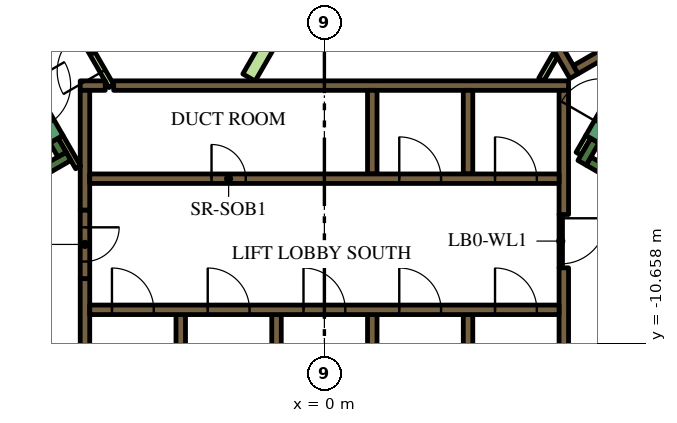
"""IFC4 building model, lengths in metres.
Left out: names, types, materials, properties, quantities, classifications, styles, units other than length and angle.
Written with IfcOpenShell. Run it as: python <this file> out.ifc"""

import sys

from ifc_helpers import new_model, si_unit, direction, frame, frame_2d, origin, place, context, subcontext, project, spatial, polyline, rectangle, outline, extrude, element, fill, save


model = new_model("IFC4")
c1 = context("Model", 3, precision=1e-05, world=origin(), true_north=direction((0.0, 1.0)))
c2 = subcontext(c1, "Body", "Model", "MODEL_VIEW")
j1 = project(units=[si_unit("LENGTHUNIT", "METRE"), si_unit("PLANEANGLEUNIT", "RADIAN")], contexts=[c1])
p1 = place(None, origin())
s1 = spatial("IfcSite", under=j1, at=p1, CompositionType="ELEMENT")
p2 = place(p1, origin())
s2 = spatial("IfcBuilding", under=s1, at=p2, CompositionType="ELEMENT")
p3 = place(p2, frame((0.0, 0.0, 35.4)))
s3 = spatial("IfcBuildingStorey", under=s2, at=p3, CompositionType="ELEMENT", Elevation=35.4)
p4 = place(p3, frame((6.711, 13.476, 0.0), z_axis=(0.0, 0.0, 1.0), x_axis=(0.500002723396, -0.866023831425, 0.0)))
e1 = element("IfcWall", 1, at=p4, inside=s3, PredefinedType="SOLIDWALL", context=c2, shape_type="SweptSolid", body=[
    extrude(rectangle(XDim=20.334, YDim=0.9, at=frame_2d((10.167, 0.0))), origin(), (0.0, 0.0, 1.0), 3.9),
])
p5 = place(p3, frame((12.84, -9.261, 0.0), z_axis=(0.0, 0.0, 1.0), x_axis=(-0.866013990052, 0.500019768644, 0.0)))
e2 = element("IfcWall", 2, at=p5, inside=s3, PredefinedType="SOLIDWALL", context=c2, shape_type="SweptSolid", body=[
    extrude(rectangle(XDim=6.8, YDim=0.25, at=frame_2d((3.4, 0.0))), origin(), (0.0, 0.0, 1.0), 3.9),
])
p6 = place(p3, frame((6.78, -5.906, 0.0), z_axis=(0.0, 0.0, 1.0), x_axis=(0.500223362819, 0.865896406789, 0.0)))
e3 = element("IfcWall", 3, at=p6, inside=s3, PredefinedType="SOLIDWALL", context=c2, shape_type="SweptSolid", body=[
    extrude(rectangle(XDim=0.675, YDim=0.25, at=frame_2d((0.337, 0.0))), origin(), (0.0, 0.0, 1.0), 3.9),
])
p7 = place(p3, frame((-12.84, -9.261, 0.0), z_axis=(0.0, 0.0, 1.0), x_axis=(0.866016039709, 0.500016218704, 0.0)))
e4 = element("IfcWall", 4, at=p7, inside=s3, PredefinedType="SOLIDWALL", context=c2, shape_type="SweptSolid", body=[
    extrude(rectangle(XDim=7.05, YDim=0.25, at=frame_2d((3.525, 0.0))), origin(), (0.0, 0.0, 1.0), 3.9),
])
p8 = place(p3, frame((-6.905, -5.69, 0.0), z_axis=(0.0, 0.0, 1.0), x_axis=(-0.500402024738, 0.865793170242, 0.0)))
e5 = element("IfcWall", 5, at=p8, inside=s3, PredefinedType="SOLIDWALL", context=c2, shape_type="SweptSolid", body=[
    extrude(rectangle(XDim=0.425, YDim=0.25, at=frame_2d((0.212, 0.0))), origin(), (0.0, 0.0, 1.0), 3.9),
])
p9 = place(p3, frame((-3.78, -12.1, 0.0), z_axis=(0.0, 0.0, 1.0), x_axis=(0.0, 1.0, 0.0)))
e6 = element("IfcWall", 6, at=p9, inside=s3, PredefinedType="SOLIDWALL", context=c2, shape_type="SweptSolid", body=[
    extrude(rectangle(XDim=2.2, YDim=0.25, at=frame_2d((1.1, 0.0))), origin(), (0.0, 0.0, 1.0), 3.9),
])
p10 = place(p3, frame((-6.3, -12.1, 0.0), z_axis=(0.0, 0.0, 1.0), x_axis=(0.0, 1.0, 0.0)))
e7 = element("IfcWall", 7, at=p10, inside=s3, PredefinedType="SOLIDWALL", context=c2, shape_type="SweptSolid", body=[
    extrude(rectangle(XDim=3.146, YDim=0.25, at=frame_2d((1.573, 0.0))), origin(), (0.0, 0.0, 1.0), 3.9),
])
p11 = place(p3, frame((-5.545, -3.875, 0.0), z_axis=(0.0, 0.0, 1.0), x_axis=(1.0, 0.0, 0.0)))
e8 = element("IfcWall", 8, at=p11, inside=s3, PredefinedType="SOLIDWALL", context=c2, shape_type="SweptSolid", body=[
    extrude(rectangle(XDim=11.97, YDim=0.25, at=frame_2d((5.985, 0.0))), origin(), (0.0, 0.0, 1.0), 3.9),
])
p12 = place(p3, frame((-6.425, -3.875, 0.0), z_axis=(0.0, 0.0, 1.0), x_axis=(1.0, 0.0, 0.0)))
e9 = element("IfcWall", 9, at=p12, inside=s3, PredefinedType="SOLIDWALL", context=c2, shape_type="SweptSolid", body=[
    extrude(rectangle(XDim=0.658, YDim=0.25, at=frame_2d((0.329, 0.0))), origin(), (0.0, 0.0, 1.0), 3.9),
])
p13 = place(p3, frame((6.3, -8.67, 0.0), z_axis=(0.0, 0.0, 1.0), x_axis=(0.0, -1.0, 0.0)))
e10 = element("IfcWall", 10, at=p13, inside=s3, PredefinedType="SOLIDWALL", context=c2, shape_type="SweptSolid", body=[
    extrude(rectangle(XDim=3.43, YDim=0.25, at=frame_2d((1.715, 0.0))), origin(), (0.0, 0.0, 1.0), 3.9),
])
p14 = place(p3, frame((6.3, -7.268, 0.0), z_axis=(0.0, 0.0, 1.0), x_axis=(0.0, 1.0, 0.0)))
e11 = element("IfcWall", 11, at=p14, inside=s3, PredefinedType="SOLIDWALL", context=c2, shape_type="SweptSolid", body=[
    extrude(rectangle(XDim=3.268, YDim=0.25, at=frame_2d((1.634, 0.0))), origin(), (0.0, 0.0, 1.0), 3.9),
])
for number, where, z_axis, x_axis in (
    (12, (3.78, -4.0, 0.0), (0.0, 0.0, 1.0), (0.0, -1.0, 0.0)),
    (13, (1.26, -4.0, 0.0), (0.0, 0.0, 1.0), (0.0, -1.0, 0.0)),
):
    element("IfcWall", number, at=place(p3, frame(where, z_axis=z_axis, x_axis=x_axis)), inside=s3, PredefinedType="SOLIDWALL", context=c2, shape_type="SweptSolid", body=[
        extrude(rectangle(XDim=2.2, YDim=0.25, at=frame_2d((1.1, 0.0))), origin(), (0.0, 0.0, 1.0), 3.9),
    ])
p15 = place(p3, frame((-6.3, -4.0, 0.0), z_axis=(0.0, 0.0, 1.0), x_axis=(0.0, -1.0, 0.0)))
e14 = element("IfcWall", 14, at=p15, inside=s3, PredefinedType="SOLIDWALL", context=c2, shape_type="SweptSolid", body=[
    extrude(rectangle(XDim=3.154, YDim=0.25, at=frame_2d((1.577, 0.0))), origin(), (0.0, 0.0, 1.0), 3.9),
])
for number, where, z_axis, x_axis in (
    (15, (3.78, -12.1, 0.0), (0.0, 0.0, 1.0), (0.0, 1.0, 0.0)),
    (16, (1.26, -12.1, 0.0), (0.0, 0.0, 1.0), (0.0, 1.0, 0.0)),
    (17, (-1.26, -12.1, 0.0), (0.0, 0.0, 1.0), (0.0, 1.0, 0.0)),
):
    element("IfcWall", number, at=place(p3, frame(where, z_axis=z_axis, x_axis=x_axis)), inside=s3, PredefinedType="SOLIDWALL", context=c2, shape_type="SweptSolid", body=[
        extrude(rectangle(XDim=2.2, YDim=0.25, at=frame_2d((1.1, 0.0))), origin(), (0.0, 0.0, 1.0), 3.9),
    ])
p16 = place(p3, origin())
e18 = element("IfcWall", 18, at=p16, inside=s3, PredefinedType="SOLIDWALL", context=c2, shape_type="SweptSolid", body=[
    extrude(outline(polyline([(0.566, 6.725), (0.566, 6.875), (0.566, 6.875), (0.565, 6.875), (0.361, 6.875), (0.035, 7.439), (0.252, 7.564), (0.377, 7.348), (6.552, -3.348), (6.677, -3.564), (6.46, -3.689), (0.448, 6.725), (0.565, 6.725), (0.566, 6.725), (0.566, 6.725)])), origin(), (0.0, 0.0, 1.0), 3.9),
])
p17 = place(p3, frame((6.614, -3.456, 0.0), z_axis=(0.0, 0.0, 1.0), x_axis=(0.86602447079, 0.500001615989, 0.0)))
e19 = element("IfcWall", 19, at=p17, inside=s3, PredefinedType="SOLIDWALL", context=c2, shape_type="SweptSolid", body=[
    extrude(rectangle(XDim=3.154, YDim=0.25, at=frame_2d((1.577, 0.0))), origin(), (0.0, 0.0, 1.0), 3.9),
])
p18 = place(p3, frame((-6.48, -6.027, 0.0), z_axis=(0.0, 0.0, 1.0), x_axis=(-0.499927229454, 0.866067413802, 0.0)))
e20 = element("IfcWall", 20, at=p18, inside=s3, PredefinedType="PARTITIONING", context=c2, shape_type="SweptSolid", body=[
    extrude(rectangle(XDim=0.929, YDim=0.15, at=frame_2d((0.464, 0.0))), origin(), (0.0, 0.0, 1.0), 3.9),
])
p19 = place(p3, frame((6.945, -5.222, 0.0), z_axis=(0.0, 0.0, 1.0), x_axis=(-0.499818422106, -0.866130212453, 0.0)))
e21 = element("IfcWall", 21, at=p19, inside=s3, PredefinedType="PARTITIONING", context=c2, shape_type="SweptSolid", body=[
    extrude(rectangle(XDim=0.514, YDim=0.15, at=frame_2d((0.257, 0.0))), origin(), (0.0, 0.0, 1.0), 2.75),
])
p20 = place(p3, frame((5.705, -3.718, 0.0), z_axis=(0.0, 0.0, 1.0), x_axis=(0.499962090823, 0.866047289552, 0.0)))
e22 = element("IfcWall", 22, at=p20, inside=s3, PredefinedType="PARTITIONING", context=c2, shape_type="SweptSolid", body=[
    extrude(rectangle(XDim=0.735, YDim=0.15, at=frame_2d((0.367, 0.0))), origin(), (0.0, 0.0, 1.0), 2.75),
])
e23 = element("IfcWall", 23, at=p16, inside=s3, PredefinedType="PARTITIONING", context=c2, shape_type="SweptSolid", body=[
    extrude(outline(polyline([(-0.59, -0.872), (-0.265, -1.059), (-1.822, -3.756), (-2.147, -3.568), (-0.59, -0.872)])), origin(), (0.0, 0.0, 1.0), 2.75),
])
p21 = place(p3, frame((-6.175, -9.775, 0.0), z_axis=(0.0, 0.0, 1.0), x_axis=(1.0, 0.0, 0.0)))
e24 = element("IfcWall", 24, at=p21, inside=s3, PredefinedType="SOLIDWALL", context=c2, shape_type="SweptSolid", body=[
    extrude(rectangle(XDim=12.35, YDim=0.25, at=frame_2d((6.175, 0.0))), origin(), (0.0, 0.0, 1.0), 3.9),
])
p22 = place(p21, frame((0.585, 0.0, 0.0)))
e25 = element("IfcOpeningElement", 25, at=p22, cuts=e24, PredefinedType="OPENING", context=c2, shape_type="SweptSolid", body=[
    extrude(rectangle(XDim=1.1, YDim=2.1, at=frame_2d((0.55, 1.05))), frame((0.0, 0.135, 0.0), z_axis=(0.0, -1.0, 0.0), x_axis=(1.0, 0.0, 0.0)), (0.0, 0.0, 1.0), 0.27),
])
p23 = place(p21, frame((3.105, 0.0, 0.0)))
e26 = element("IfcOpeningElement", 26, at=p23, cuts=e24, PredefinedType="OPENING", context=c2, shape_type="SweptSolid", body=[
    extrude(rectangle(XDim=1.1, YDim=2.1, at=frame_2d((0.55, 1.05))), frame((0.0, 0.135, 0.0), z_axis=(0.0, -1.0, 0.0), x_axis=(1.0, 0.0, 0.0)), (0.0, 0.0, 1.0), 0.27),
])
p24 = place(p21, frame((5.625, 0.0, 0.0)))
e27 = element("IfcOpeningElement", 27, at=p24, cuts=e24, PredefinedType="OPENING", context=c2, shape_type="SweptSolid", body=[
    extrude(rectangle(XDim=1.1, YDim=2.1, at=frame_2d((0.55, 1.05))), frame((0.0, 0.135, 0.0), z_axis=(0.0, -1.0, 0.0), x_axis=(1.0, 0.0, 0.0)), (0.0, 0.0, 1.0), 0.27),
])
p25 = place(p21, frame((8.145, 0.0, 0.0)))
e28 = element("IfcOpeningElement", 28, at=p25, cuts=e24, PredefinedType="OPENING", context=c2, shape_type="SweptSolid", body=[
    extrude(rectangle(XDim=1.1, YDim=2.1, at=frame_2d((0.55, 1.05))), frame((0.0, 0.135, 0.0), z_axis=(0.0, -1.0, 0.0), x_axis=(1.0, 0.0, 0.0)), (0.0, 0.0, 1.0), 0.27),
])
p26 = place(p21, frame((10.665, 0.0, 0.0)))
e29 = element("IfcOpeningElement", 29, at=p26, cuts=e24, PredefinedType="OPENING", context=c2, shape_type="SweptSolid", body=[
    extrude(rectangle(XDim=1.1, YDim=2.1, at=frame_2d((0.55, 1.05))), frame((0.0, 0.135, 0.0), z_axis=(0.0, -1.0, 0.0), x_axis=(1.0, 0.0, 0.0)), (0.0, 0.0, 1.0), 0.27),
])
p27 = place(p3, frame((-6.175, -6.325, 0.0), z_axis=(0.0, 0.0, 1.0), x_axis=(1.0, 0.0, 0.0)))
e30 = element("IfcWall", 30, at=p27, inside=s3, PredefinedType="SOLIDWALL", context=c2, shape_type="SweptSolid", body=[
    extrude(rectangle(XDim=12.35, YDim=0.25, at=frame_2d((6.175, 0.0))), origin(), (0.0, 0.0, 1.0), 3.9),
])
p28 = place(p27, frame((3.205, 0.0, 0.0)))
e31 = element("IfcOpeningElement", 31, at=p28, cuts=e30, PredefinedType="OPENING", context=c2, shape_type="SweptSolid", body=[
    extrude(rectangle(XDim=0.9, YDim=2.1, at=frame_2d((0.45, 1.05))), frame((0.0, 0.135, 0.0), z_axis=(0.0, -1.0, 0.0), x_axis=(1.0, 0.0, 0.0)), (0.0, 0.0, 1.0), 0.27),
])
p29 = place(p27, frame((8.145, 0.0, 0.0)))
e32 = element("IfcOpeningElement", 32, at=p29, cuts=e30, PredefinedType="OPENING", context=c2, shape_type="SweptSolid", body=[
    extrude(rectangle(XDim=1.1, YDim=2.1, at=frame_2d((0.55, 1.05))), frame((0.0, 0.135, 0.0), z_axis=(0.0, -1.0, 0.0), x_axis=(1.0, 0.0, 0.0)), (0.0, 0.0, 1.0), 0.27),
])
p30 = place(p27, frame((10.665, 0.0, 0.0)))
e33 = element("IfcOpeningElement", 33, at=p30, cuts=e30, PredefinedType="OPENING", context=c2, shape_type="SweptSolid", body=[
    extrude(rectangle(XDim=1.1, YDim=2.1, at=frame_2d((0.55, 1.05))), frame((0.0, 0.135, 0.0), z_axis=(0.0, -1.0, 0.0), x_axis=(1.0, 0.0, 0.0)), (0.0, 0.0, 1.0), 0.27),
])
p31 = place(p3, frame((7.053, -5.284, 0.0), z_axis=(0.0, 0.0, 1.0), x_axis=(0.500078061341, 0.865980330357, 0.0)))
e34 = element("IfcWall", 34, at=p31, inside=s3, PredefinedType="SOLIDWALL", context=c2, shape_type="SweptSolid", body=[
    extrude(rectangle(XDim=2.1, YDim=0.4, at=frame_2d((1.05, 0.0))), origin(), (0.0, 0.0, 1.0), 3.9),
])
p32 = place(p31, frame((0.45, 0.0, 0.0)))
e35 = element("IfcOpeningElement", 35, at=p32, cuts=e34, PredefinedType="OPENING", context=c2, shape_type="SweptSolid", body=[
    extrude(rectangle(XDim=1.2, YDim=2.1, at=frame_2d((0.6, 1.05))), frame((0.0, 0.21, 0.0), z_axis=(0.0, -1.0, 0.0), x_axis=(1.0, 0.0, 0.0)), (0.0, 0.0, 1.0), 0.42),
])
p33 = place(p3, frame((-8.103, -3.466, 0.0), z_axis=(0.0, 0.0, 1.0), x_axis=(0.500078061341, -0.865980330357, 0.0)))
e36 = element("IfcWall", 36, at=p33, inside=s3, PredefinedType="SOLIDWALL", context=c2, shape_type="SweptSolid", body=[
    extrude(rectangle(XDim=2.1, YDim=0.4, at=frame_2d((1.05, 0.0))), origin(), (0.0, 0.0, 1.0), 3.9),
])
p34 = place(p33, frame((0.45, 0.0, 0.0)))
e37 = element("IfcOpeningElement", 37, at=p34, cuts=e36, PredefinedType="OPENING", context=c2, shape_type="SweptSolid", body=[
    extrude(rectangle(XDim=1.2, YDim=2.1, at=frame_2d((0.6, 1.05))), frame((0.0, 0.21, 0.0), z_axis=(0.0, -1.0, 0.0), x_axis=(1.0, 0.0, 0.0)), (0.0, 0.0, 1.0), 0.42),
])
p35 = place(p3, frame((-6.3, -7.154, 0.0), z_axis=(0.0, 0.0, 1.0), x_axis=(0.0, -1.0, 0.0)))
e38 = element("IfcWall", 38, at=p35, inside=s3, PredefinedType="SOLIDWALL", context=c2, shape_type="SweptSolid", body=[
    extrude(rectangle(XDim=1.8, YDim=0.25, at=frame_2d((0.9, 0.0))), origin(), (0.0, 0.0, 1.0), 3.9),
])
p36 = place(p35, frame((0.45, 0.0, 0.0)))
e39 = element("IfcOpeningElement", 39, at=p36, cuts=e38, PredefinedType="OPENING", context=c2, shape_type="SweptSolid", body=[
    extrude(rectangle(XDim=0.9, YDim=2.1, at=frame_2d((0.45, 1.05))), frame((0.0, 0.135, 0.0), z_axis=(0.0, -1.0, 0.0), x_axis=(1.0, 0.0, 0.0)), (0.0, 0.0, 1.0), 0.27),
])
p37 = place(p3, frame((-5.606, -3.89, 0.0), z_axis=(0.0, 0.0, 1.0), x_axis=(-0.500027713859, 0.866009402589, 0.0)))
e40 = element("IfcWall", 40, at=p37, inside=s3, PredefinedType="PARTITIONING", context=c2, shape_type="SweptSolid", body=[
    extrude(rectangle(XDim=2.1, YDim=0.15, at=frame_2d((1.05, 0.0))), origin(), (0.0, 0.0, 1.0), 2.75),
])
p38 = place(p37, frame((0.45, 0.0, 0.0)))
e41 = element("IfcOpeningElement", 41, at=p38, cuts=e40, PredefinedType="OPENING", context=c2, shape_type="SweptSolid", body=[
    extrude(rectangle(XDim=1.2, YDim=2.1, at=frame_2d((0.6, 1.05))), frame((0.0, 0.085, 0.0), z_axis=(0.0, -1.0, 0.0), x_axis=(1.0, 0.0, 0.0)), (0.0, 0.0, 1.0), 0.17),
])
p39 = place(p3, frame((6.22, -7.266, 0.0), z_axis=(0.0, 0.0, 1.0), x_axis=(0.0, -1.0, 0.0)))
e42 = element("IfcWall", 42, at=p39, inside=s3, PredefinedType="PARTITIONING", context=c2, shape_type="SweptSolid", body=[
    extrude(rectangle(XDim=1.4, YDim=0.09, at=frame_2d((0.7, 0.0))), origin(), (0.0, 0.0, 1.0), 2.75),
])
p40 = place(p39, frame((0.1, 0.0, 0.0)))
e43 = element("IfcOpeningElement", 43, at=p40, cuts=e42, PredefinedType="OPENING", context=c2, shape_type="SweptSolid", body=[
    extrude(rectangle(XDim=1.2, YDim=2.1, at=frame_2d((0.6, 1.05))), frame((0.0, 0.055, 0.0), z_axis=(0.0, -1.0, 0.0), x_axis=(1.0, 0.0, 0.0)), (0.0, 0.0, 1.0), 0.11),
])
p41 = place(p3, frame((6.163, 18.475, 0.0), z_axis=(0.0, 0.0, 1.0), x_axis=(0.500001317485, -0.866024643133, 0.0)))
e44 = element("IfcWall", 44, at=p41, inside=s3, PredefinedType="PARTITIONING", context=c2, shape_type="SweptSolid", body=[
    extrude(rectangle(XDim=25.767, YDim=0.15, at=frame_2d((12.883, 0.0))), origin(), (0.0, 0.0, 1.0), 2.75),
])
p42 = place(p41, frame((24.586, 0.0, 0.0)))
e45 = element("IfcOpeningElement", 45, at=p42, cuts=e44, PredefinedType="OPENING", context=c2, shape_type="SweptSolid", body=[
    extrude(rectangle(XDim=1.0, YDim=2.1, at=frame_2d((0.5, 1.05))), frame((0.0, 0.085, 0.0), z_axis=(0.0, -1.0, 0.0), x_axis=(1.0, 0.0, 0.0)), (0.0, 0.0, 1.0), 0.17),
])
p43 = place(p41, frame((19.319, 0.0, 0.0)))
e46 = element("IfcOpeningElement", 46, at=p43, cuts=e44, PredefinedType="OPENING", context=c2, shape_type="SweptSolid", body=[
    extrude(rectangle(XDim=1.0, YDim=2.1, at=frame_2d((0.5, 1.05))), frame((0.0, 0.085, 0.0), z_axis=(0.0, -1.0, 0.0), x_axis=(1.0, 0.0, 0.0)), (0.0, 0.0, 1.0), 0.17),
])
p44 = place(p41, frame((18.012, 0.0, 0.0)))
e47 = element("IfcOpeningElement", 47, at=p44, cuts=e44, PredefinedType="OPENING", context=c2, shape_type="SweptSolid", body=[
    extrude(rectangle(XDim=1.0, YDim=2.1, at=frame_2d((0.5, 1.05))), frame((0.0, 0.085, 0.0), z_axis=(0.0, -1.0, 0.0), x_axis=(1.0, 0.0, 0.0)), (0.0, 0.0, 1.0), 0.17),
])
p45 = place(p41, frame((6.824, 0.0, 0.0)))
e48 = element("IfcOpeningElement", 48, at=p45, cuts=e44, PredefinedType="OPENING", context=c2, shape_type="SweptSolid", body=[
    extrude(rectangle(XDim=1.1, YDim=2.1, at=frame_2d((0.55, 1.05))), frame((0.0, 0.085, 0.0), z_axis=(0.0, -1.0, 0.0), x_axis=(1.0, 0.0, 0.0)), (0.0, 0.0, 1.0), 0.17),
])
p46 = place(p41, frame((4.658, 0.0, 0.0)))
e49 = element("IfcOpeningElement", 49, at=p46, cuts=e44, PredefinedType="OPENING", context=c2, shape_type="SweptSolid", body=[
    extrude(rectangle(XDim=0.9, YDim=2.1, at=frame_2d((0.45, 1.05))), frame((0.0, 0.085, 0.0), z_axis=(0.0, -1.0, 0.0), x_axis=(1.0, 0.0, 0.0)), (0.0, 0.0, 1.0), 0.17),
])
p47 = place(p41, frame((0.18, 0.0, 0.0)))
e50 = element("IfcOpeningElement", 50, at=p47, cuts=e44, PredefinedType="OPENING", context=c2, shape_type="SweptSolid", body=[
    extrude(rectangle(XDim=1.0, YDim=2.1, at=frame_2d((0.5, 1.05))), frame((0.0, 0.085, 0.0), z_axis=(0.0, -1.0, 0.0), x_axis=(1.0, 0.0, 0.0)), (0.0, 0.0, 1.0), 0.17),
])
p48 = place(p3, frame((-19.081, -3.9, 0.0), z_axis=(0.0, 0.0, 1.0), x_axis=(0.499998313975, 0.866026377209, 0.0)))
e51 = element("IfcWall", 51, at=p48, inside=s3, PredefinedType="PARTITIONING", context=c2, shape_type="SweptSolid", body=[
    extrude(rectangle(XDim=25.766, YDim=0.15, at=frame_2d((12.883, 0.0))), origin(), (0.0, 0.0, 1.0), 2.75),
])
p49 = place(p48, frame((24.586, 0.0, 0.0)))
e52 = element("IfcOpeningElement", 52, at=p49, cuts=e51, PredefinedType="OPENING", context=c2, shape_type="SweptSolid", body=[
    extrude(rectangle(XDim=1.0, YDim=2.1, at=frame_2d((0.5, 1.05))), frame((0.0, 0.085, 0.0), z_axis=(0.0, -1.0, 0.0), x_axis=(1.0, 0.0, 0.0)), (0.0, 0.0, 1.0), 0.17),
])
p50 = place(p48, frame((16.196, 0.0, 0.0)))
e53 = element("IfcOpeningElement", 53, at=p50, cuts=e51, PredefinedType="OPENING", context=c2, shape_type="SweptSolid", body=[
    extrude(rectangle(XDim=1.0, YDim=2.1, at=frame_2d((0.5, 1.05))), frame((0.0, 0.085, 0.0), z_axis=(0.0, -1.0, 0.0), x_axis=(1.0, 0.0, 0.0)), (0.0, 0.0, 1.0), 0.17),
])
p51 = place(p48, frame((14.789, 0.0, 0.0)))
e54 = element("IfcOpeningElement", 54, at=p51, cuts=e51, PredefinedType="OPENING", context=c2, shape_type="SweptSolid", body=[
    extrude(rectangle(XDim=1.1, YDim=2.1, at=frame_2d((0.55, 1.05))), frame((0.0, 0.085, 0.0), z_axis=(0.0, -1.0, 0.0), x_axis=(1.0, 0.0, 0.0)), (0.0, 0.0, 1.0), 0.17),
])
p52 = place(p48, frame((3.698, 0.0, 0.0)))
e55 = element("IfcOpeningElement", 55, at=p52, cuts=e51, PredefinedType="OPENING", context=c2, shape_type="SweptSolid", body=[
    extrude(rectangle(XDim=1.0, YDim=2.1, at=frame_2d((0.5, 1.05))), frame((0.0, 0.085, 0.0), z_axis=(0.0, -1.0, 0.0), x_axis=(1.0, 0.0, 0.0)), (0.0, 0.0, 1.0), 0.17),
])
p53 = place(p48, frame((1.531, 0.0, 0.0)))
e56 = element("IfcOpeningElement", 56, at=p53, cuts=e51, PredefinedType="OPENING", context=c2, shape_type="SweptSolid", body=[
    extrude(rectangle(XDim=0.9, YDim=2.1, at=frame_2d((0.45, 1.05))), frame((0.0, 0.085, 0.0), z_axis=(0.0, -1.0, 0.0), x_axis=(1.0, 0.0, 0.0)), (0.0, 0.0, 1.0), 0.17),
])
p54 = place(p22, origin())
e57 = element("IfcDoor", 57, at=p54, inside=s3, OperationType="DOUBLE_DOOR_SLIDING", PredefinedType="DOOR", context=c2, shape_type="SweptSolid", body=[
    extrude(rectangle(XDim=1.1, YDim=2.1, at=frame_2d((0.55, 1.05))), frame((0.0, 0.025, 0.0), z_axis=(0.0, -1.0, 0.0), x_axis=(1.0, 0.0, 0.0)), (0.0, 0.0, 1.0), 0.05),
])
fill(e25, e57)
p55 = place(p23, origin())
e58 = element("IfcDoor", 58, at=p55, inside=s3, OperationType="DOUBLE_DOOR_SLIDING", PredefinedType="DOOR", context=c2, shape_type="SweptSolid", body=[
    extrude(rectangle(XDim=1.1, YDim=2.1, at=frame_2d((0.55, 1.05))), frame((0.0, 0.025, 0.0), z_axis=(0.0, -1.0, 0.0), x_axis=(1.0, 0.0, 0.0)), (0.0, 0.0, 1.0), 0.05),
])
fill(e26, e58)
p56 = place(p24, origin())
e59 = element("IfcDoor", 59, at=p56, inside=s3, OperationType="DOUBLE_DOOR_SLIDING", PredefinedType="DOOR", context=c2, shape_type="SweptSolid", body=[
    extrude(rectangle(XDim=1.1, YDim=2.1, at=frame_2d((0.55, 1.05))), frame((0.0, 0.025, 0.0), z_axis=(0.0, -1.0, 0.0), x_axis=(1.0, 0.0, 0.0)), (0.0, 0.0, 1.0), 0.05),
])
fill(e27, e59)
p57 = place(p25, origin())
e60 = element("IfcDoor", 60, at=p57, inside=s3, OperationType="DOUBLE_DOOR_SLIDING", PredefinedType="DOOR", context=c2, shape_type="SweptSolid", body=[
    extrude(rectangle(XDim=1.1, YDim=2.1, at=frame_2d((0.55, 1.05))), frame((0.0, 0.025, 0.0), z_axis=(0.0, -1.0, 0.0), x_axis=(1.0, 0.0, 0.0)), (0.0, 0.0, 1.0), 0.05),
])
fill(e28, e60)
p58 = place(p26, origin())
e61 = element("IfcDoor", 61, at=p58, inside=s3, OperationType="DOUBLE_DOOR_SLIDING", PredefinedType="DOOR", context=c2, shape_type="SweptSolid", body=[
    extrude(rectangle(XDim=1.1, YDim=2.1, at=frame_2d((0.55, 1.05))), frame((0.0, 0.025, 0.0), z_axis=(0.0, -1.0, 0.0), x_axis=(1.0, 0.0, 0.0)), (0.0, 0.0, 1.0), 0.05),
])
fill(e29, e61)
p59 = place(p28, origin())
e62 = element("IfcDoor", 62, at=p59, inside=s3, OperationType="SINGLE_SWING_LEFT", PredefinedType="DOOR", context=c2, shape_type="SweptSolid", body=[
    extrude(rectangle(XDim=0.9, YDim=2.1, at=frame_2d((0.45, 1.05))), frame((0.0, 0.025, 0.0), z_axis=(0.0, -1.0, 0.0), x_axis=(1.0, 0.0, 0.0)), (0.0, 0.0, 1.0), 0.05),
])
fill(e31, e62)
p60 = place(p29, origin())
e63 = element("IfcDoor", 63, at=p60, inside=s3, OperationType="DOUBLE_DOOR_SLIDING", PredefinedType="DOOR", context=c2, shape_type="SweptSolid", body=[
    extrude(rectangle(XDim=1.1, YDim=2.1, at=frame_2d((0.55, 1.05))), frame((0.0, 0.025, 0.0), z_axis=(0.0, -1.0, 0.0), x_axis=(1.0, 0.0, 0.0)), (0.0, 0.0, 1.0), 0.05),
])
fill(e32, e63)
p61 = place(p30, origin())
e64 = element("IfcDoor", 64, at=p61, inside=s3, OperationType="DOUBLE_DOOR_SLIDING", PredefinedType="DOOR", context=c2, shape_type="SweptSolid", body=[
    extrude(rectangle(XDim=1.1, YDim=2.1, at=frame_2d((0.55, 1.05))), frame((0.0, 0.025, 0.0), z_axis=(0.0, -1.0, 0.0), x_axis=(1.0, 0.0, 0.0)), (0.0, 0.0, 1.0), 0.05),
])
fill(e33, e64)
p62 = place(p36, origin())
e65 = element("IfcDoor", 65, at=p62, inside=s3, OperationType="SINGLE_SWING_LEFT", PredefinedType="DOOR", context=c2, shape_type="SweptSolid", body=[
    extrude(rectangle(XDim=0.9, YDim=2.1, at=frame_2d((0.45, 1.05))), frame((0.0, 0.025, 0.0), z_axis=(0.0, -1.0, 0.0), x_axis=(1.0, 0.0, 0.0)), (0.0, 0.0, 1.0), 0.05),
])
fill(e39, e65)
p63 = place(p38, origin())
e66 = element("IfcDoor", 66, at=p63, inside=s3, OperationType="SINGLE_SWING_LEFT", PredefinedType="DOOR", context=c2, shape_type="SweptSolid", body=[
    extrude(rectangle(XDim=1.2, YDim=2.1, at=frame_2d((0.6, 1.05))), frame((0.0, 0.025, 0.0), z_axis=(0.0, -1.0, 0.0), x_axis=(1.0, 0.0, 0.0)), (0.0, 0.0, 1.0), 0.05),
])
fill(e41, e66)
p64 = place(p40, origin())
e67 = element("IfcDoor", 67, at=p64, inside=s3, OperationType="SINGLE_SWING_LEFT", PredefinedType="DOOR", context=c2, shape_type="SweptSolid", body=[
    extrude(rectangle(XDim=1.2, YDim=2.1, at=frame_2d((0.6, 1.05))), frame((0.0, 0.025, 0.0), z_axis=(0.0, -1.0, 0.0), x_axis=(1.0, 0.0, 0.0)), (0.0, 0.0, 1.0), 0.05),
])
fill(e43, e67)
save(model, sys.argv[1])
